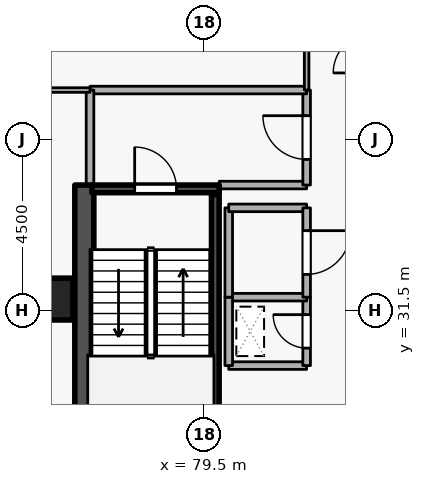
"""IFC4 building model, lengths in metres.
Left out: names, types, materials, properties, quantities, classifications, styles, units other than length and angle.
Written with IfcOpenShell. Run it as: python <this file> out.ifc"""

import sys

from ifc_helpers import new_model, si_unit, direction, frame, frame_2d, origin, origin_2d, place, context, subcontext, project, spatial, rectangle, extrude, element, fill, save


model = new_model("IFC4")
c1 = context("Model", 3, precision=1e-05, world=origin(), true_north=direction((0.0, 1.0)))
c2 = subcontext(c1, "Body", "Model", "MODEL_VIEW")
j1 = project(units=[si_unit("LENGTHUNIT", "METRE"), si_unit("PLANEANGLEUNIT", "RADIAN")], contexts=[c1])
p1 = place(None, origin())
s1 = spatial("IfcSite", under=j1, at=p1, CompositionType="ELEMENT")
p2 = place(p1, origin())
s2 = spatial("IfcBuilding", under=s1, at=p2, CompositionType="ELEMENT")
p3 = place(p2, frame((0.0, 0.0, 196.5)))
s3 = spatial("IfcBuildingStorey", under=s2, at=p3, CompositionType="ELEMENT", Elevation=196.5)
p4 = place(p3, frame((76.35, 19.2, 0.0), z_axis=(0.0, 0.0, 1.0), x_axis=(0.0, 1.0, 0.0)))
e1 = element("IfcWall", 1, at=p4, inside=s3, PredefinedType="SHEAR", context=c2, shape_type="SweptSolid", body=[
    extrude(rectangle(XDim=15.6, YDim=0.5, at=frame_2d((7.8, 0.0))), origin(), (0.0, 0.0, 1.0), 3.6),
])
p5 = place(p3, frame((75.5, 31.8, 0.0), z_axis=(0.0, 0.0, 1.0), x_axis=(1.0, 0.0, 0.0)))
e2 = element("IfcColumn", 2, at=p5, inside=s3, PredefinedType="COLUMN", context=c2, shape_type="SweptSolid", body=[
    extrude(rectangle(XDim=1.1, YDim=1.1, at=origin_2d()), origin(), (0.0, 0.0, 1.0), 3.6),
])
p6 = place(p3, frame((76.55, 34.7, 0.0), z_axis=(0.0, 0.0, 1.0), x_axis=(1.0, 0.0, 0.0)))
e3 = element("IfcWall", 3, at=p6, inside=s3, PredefinedType="SHEAR", context=c2, shape_type="SweptSolid", body=[
    extrude(rectangle(XDim=3.35, YDim=0.2, at=frame_2d((1.675, 0.0))), origin(), (0.0, 0.0, 1.0), 3.6),
])
p7 = place(p6, frame((1.125, 0.0, 0.0)))
e4 = element("IfcOpeningElement", 4, at=p7, cuts=e3, PredefinedType="OPENING", context=c2, shape_type="SweptSolid", body=[
    extrude(rectangle(XDim=1.1, YDim=2.1, at=frame_2d((0.55, 1.05))), frame((0.0, 0.11, 0.0), z_axis=(0.0, -1.0, 0.0), x_axis=(1.0, 0.0, 0.0)), (0.0, 0.0, 1.0), 0.22),
])
p8 = place(p3, frame((79.797, 27.45, 0.0), z_axis=(0.0, 0.0, 1.0), x_axis=(0.0, 1.0, 0.0)))
e5 = element("IfcWall", 5, at=p8, inside=s3, PredefinedType="SHEAR", context=c2, shape_type="SweptSolid", body=[
    extrude(rectangle(XDim=7.1, YDim=0.2, at=frame_2d((3.55, 0.0))), origin(), (0.0, 0.0, 1.0), 3.6),
])
p9 = place(p3, frame((79.9, 34.8, 0.0), z_axis=(0.0, 0.0, 1.0), x_axis=(1.0, 0.0, 0.0)))
e6 = element("IfcWall", 6, at=p9, inside=s3, PredefinedType="STANDARD", context=c2, shape_type="SweptSolid", body=[
    extrude(rectangle(XDim=2.3, YDim=0.2, at=frame_2d((1.15, 0.0))), origin(), (0.0, 0.0, 1.0), 2.525),
])
p10 = place(p3, frame((82.2, 34.8, 0.0), z_axis=(0.0, 0.0, 1.0), x_axis=(0.0, 1.0, 0.0)))
e7 = element("IfcWall", 7, at=p10, inside=s3, PredefinedType="STANDARD", context=c2, shape_type="SweptSolid", body=[
    extrude(rectangle(XDim=2.5, YDim=0.2, at=frame_2d((1.25, 0.0))), origin(), (0.0, 0.0, 1.0), 3.32),
])
p11 = place(p10, frame((0.675, 0.0, 0.0)))
e8 = element("IfcOpeningElement", 8, at=p11, cuts=e7, PredefinedType="OPENING", context=c2, shape_type="SweptSolid", body=[
    extrude(rectangle(XDim=1.15, YDim=2.1, at=frame_2d((0.575, 1.05))), frame((0.0, 0.11, 0.0), z_axis=(0.0, -1.0, 0.0), x_axis=(1.0, 0.0, 0.0)), (0.0, 0.0, 1.0), 0.22),
])
p12 = place(p3, frame((82.2, 37.3, 0.0), z_axis=(0.0, 0.0, 1.0), x_axis=(-1.0, 0.0, 0.0)))
e9 = element("IfcWall", 9, at=p12, inside=s3, PredefinedType="STANDARD", context=c2, shape_type="SweptSolid", body=[
    extrude(rectangle(XDim=5.7, YDim=0.2, at=frame_2d((2.85, 0.0))), origin(), (0.0, 0.0, 1.0), 3.32),
])
p13 = place(p3, frame((76.5, 37.3, 0.0), z_axis=(0.0, 0.0, 1.0), x_axis=(0.0, -1.0, 0.0)))
e10 = element("IfcWall", 10, at=p13, inside=s3, PredefinedType="STANDARD", context=c2, shape_type="SweptSolid", body=[
    extrude(rectangle(XDim=2.5, YDim=0.2, at=frame_2d((1.25, 0.0))), origin(), (0.0, 0.0, 1.0), 3.32),
])
p14 = place(p3, frame((80.15, 30.05, 0.0), z_axis=(0.0, 0.0, 1.0), x_axis=(1.0, 0.0, 0.0)))
e11 = element("IfcWall", 11, at=p14, inside=s3, PredefinedType="STANDARD", context=c2, shape_type="SweptSolid", body=[
    extrude(rectangle(XDim=2.05, YDim=0.2, at=frame_2d((1.025, 0.0))), origin(), (0.0, 0.0, 1.0), 3.32),
])
p15 = place(p3, frame((82.2, 30.05, 0.0), z_axis=(0.0, 0.0, 1.0), x_axis=(0.0, 1.0, 0.0)))
e12 = element("IfcWall", 12, at=p15, inside=s3, PredefinedType="STANDARD", context=c2, shape_type="SweptSolid", body=[
    extrude(rectangle(XDim=1.8, YDim=0.2, at=frame_2d((0.9, 0.0))), origin(), (0.0, 0.0, 1.0), 3.32),
])
p16 = place(p15, frame((0.46, 0.0, 0.0)))
e13 = element("IfcOpeningElement", 13, at=p16, cuts=e12, PredefinedType="OPENING", context=c2, shape_type="SweptSolid", body=[
    extrude(rectangle(XDim=0.88, YDim=2.04, at=frame_2d((0.44, 1.02))), frame((0.0, 0.11, 0.0), z_axis=(0.0, -1.0, 0.0), x_axis=(1.0, 0.0, 0.0)), (0.0, 0.0, 1.0), 0.22),
])
p17 = place(p3, frame((82.2, 31.85, 0.0), z_axis=(0.0, 0.0, 1.0), x_axis=(-1.0, 0.0, 0.0)))
e14 = element("IfcWall", 14, at=p17, inside=s3, PredefinedType="STANDARD", context=c2, shape_type="SweptSolid", body=[
    extrude(rectangle(XDim=2.05, YDim=0.2, at=frame_2d((1.025, 0.0))), origin(), (0.0, 0.0, 1.0), 3.32),
])
p18 = place(p3, frame((80.15, 31.85, 0.0), z_axis=(0.0, 0.0, 1.0), x_axis=(0.0, -1.0, 0.0)))
e15 = element("IfcWall", 15, at=p18, inside=s3, PredefinedType="STANDARD", context=c2, shape_type="SweptSolid", body=[
    extrude(rectangle(XDim=1.8, YDim=0.2, at=frame_2d((0.9, 0.0))), origin(), (0.0, 0.0, 1.0), 3.32),
])
p19 = place(p3, frame((80.15, 31.85, 0.0), z_axis=(0.0, 0.0, 1.0), x_axis=(0.0, 1.0, 0.0)))
e16 = element("IfcWall", 16, at=p19, inside=s3, PredefinedType="STANDARD", context=c2, shape_type="SweptSolid", body=[
    extrude(rectangle(XDim=2.35, YDim=0.2, at=frame_2d((1.175, 0.0))), origin(), (0.0, 0.0, 1.0), 3.32),
])
p20 = place(p3, frame((80.15, 34.2, 0.0), z_axis=(0.0, 0.0, 1.0), x_axis=(1.0, 0.0, 0.0)))
e17 = element("IfcWall", 17, at=p20, inside=s3, PredefinedType="STANDARD", context=c2, shape_type="SweptSolid", body=[
    extrude(rectangle(XDim=2.05, YDim=0.2, at=frame_2d((1.025, 0.0))), origin(), (0.0, 0.0, 1.0), 2.525),
])
p21 = place(p3, frame((82.2, 34.2, 0.0), z_axis=(0.0, 0.0, 1.0), x_axis=(0.0, -1.0, 0.0)))
e18 = element("IfcWall", 18, at=p21, inside=s3, PredefinedType="STANDARD", context=c2, shape_type="SweptSolid", body=[
    extrude(rectangle(XDim=2.35, YDim=0.2, at=frame_2d((1.175, 0.0))), origin(), (0.0, 0.0, 1.0), 3.32),
])
p22 = place(p21, frame((0.6, 0.0, 0.0)))
e19 = element("IfcOpeningElement", 19, at=p22, cuts=e18, PredefinedType="OPENING", context=c2, shape_type="SweptSolid", body=[
    extrude(rectangle(XDim=1.15, YDim=2.1, at=frame_2d((0.575, 1.05))), frame((0.0, 0.11, 0.0), z_axis=(0.0, -1.0, 0.0), x_axis=(1.0, 0.0, 0.0)), (0.0, 0.0, 1.0), 0.22),
])
p23 = place(p3, frame((82.2, 39.25, 0.0), z_axis=(0.0, 0.0, 1.0), x_axis=(0.0, -1.0, 0.0)))
e20 = element("IfcWall", 20, at=p23, inside=s3, PredefinedType="PARTITIONING", context=c2, shape_type="SweptSolid", body=[
    extrude(rectangle(XDim=1.95, YDim=0.12, at=frame_2d((0.975, 0.0))), origin(), (0.0, 0.0, 1.0), 3.32),
])
p24 = place(p3, frame((76.5, 37.3, 0.0), z_axis=(0.0, 0.0, 1.0), x_axis=(-1.0, 0.0, 0.0)))
e21 = element("IfcWall", 21, at=p24, inside=s3, PredefinedType="PARTITIONING", context=c2, shape_type="SweptSolid", body=[
    extrude(rectangle(XDim=11.72, YDim=0.12, at=frame_2d((5.86, 0.0))), origin(), (0.0, 0.0, 1.0), 3.32),
])
p25 = place(p7, origin())
e22 = element("IfcDoor", 22, at=p25, inside=s3, OperationType="SINGLE_SWING_LEFT", PredefinedType="DOOR", context=c2, shape_type="SweptSolid", body=[
    extrude(rectangle(XDim=1.1, YDim=2.1, at=frame_2d((0.55, 1.05))), frame((0.0, 0.025, 0.0), z_axis=(0.0, -1.0, 0.0), x_axis=(1.0, 0.0, 0.0)), (0.0, 0.0, 1.0), 0.05),
])
fill(e4, e22)
p26 = place(p11, origin())
e23 = element("IfcDoor", 23, at=p26, inside=s3, OperationType="SINGLE_SWING_RIGHT", PredefinedType="DOOR", context=c2, shape_type="SweptSolid", body=[
    extrude(rectangle(XDim=1.15, YDim=2.1, at=frame_2d((0.575, 1.05))), frame((0.0, 0.025, 0.0), z_axis=(0.0, -1.0, 0.0), x_axis=(1.0, 0.0, 0.0)), (0.0, 0.0, 1.0), 0.05),
])
fill(e8, e23)
p27 = place(p16, origin())
e24 = element("IfcDoor", 24, at=p27, inside=s3, OperationType="SINGLE_SWING_RIGHT", PredefinedType="DOOR", context=c2, shape_type="SweptSolid", body=[
    extrude(rectangle(XDim=0.88, YDim=2.04, at=frame_2d((0.44, 1.02))), frame((0.0, 0.025, 0.0), z_axis=(0.0, -1.0, 0.0), x_axis=(1.0, 0.0, 0.0)), (0.0, 0.0, 1.0), 0.05),
])
fill(e13, e24)
p28 = place(p22, origin())
e25 = element("IfcDoor", 25, at=p28, inside=s3, OperationType="SINGLE_SWING_LEFT", PredefinedType="DOOR", context=c2, shape_type="SweptSolid", body=[
    extrude(rectangle(XDim=1.15, YDim=2.1, at=frame_2d((0.575, 1.05))), frame((0.0, 0.025, 0.0), z_axis=(0.0, -1.0, 0.0), x_axis=(1.0, 0.0, 0.0)), (0.0, 0.0, 1.0), 0.05),
])
fill(e19, e25)
save(model, sys.argv[1])
